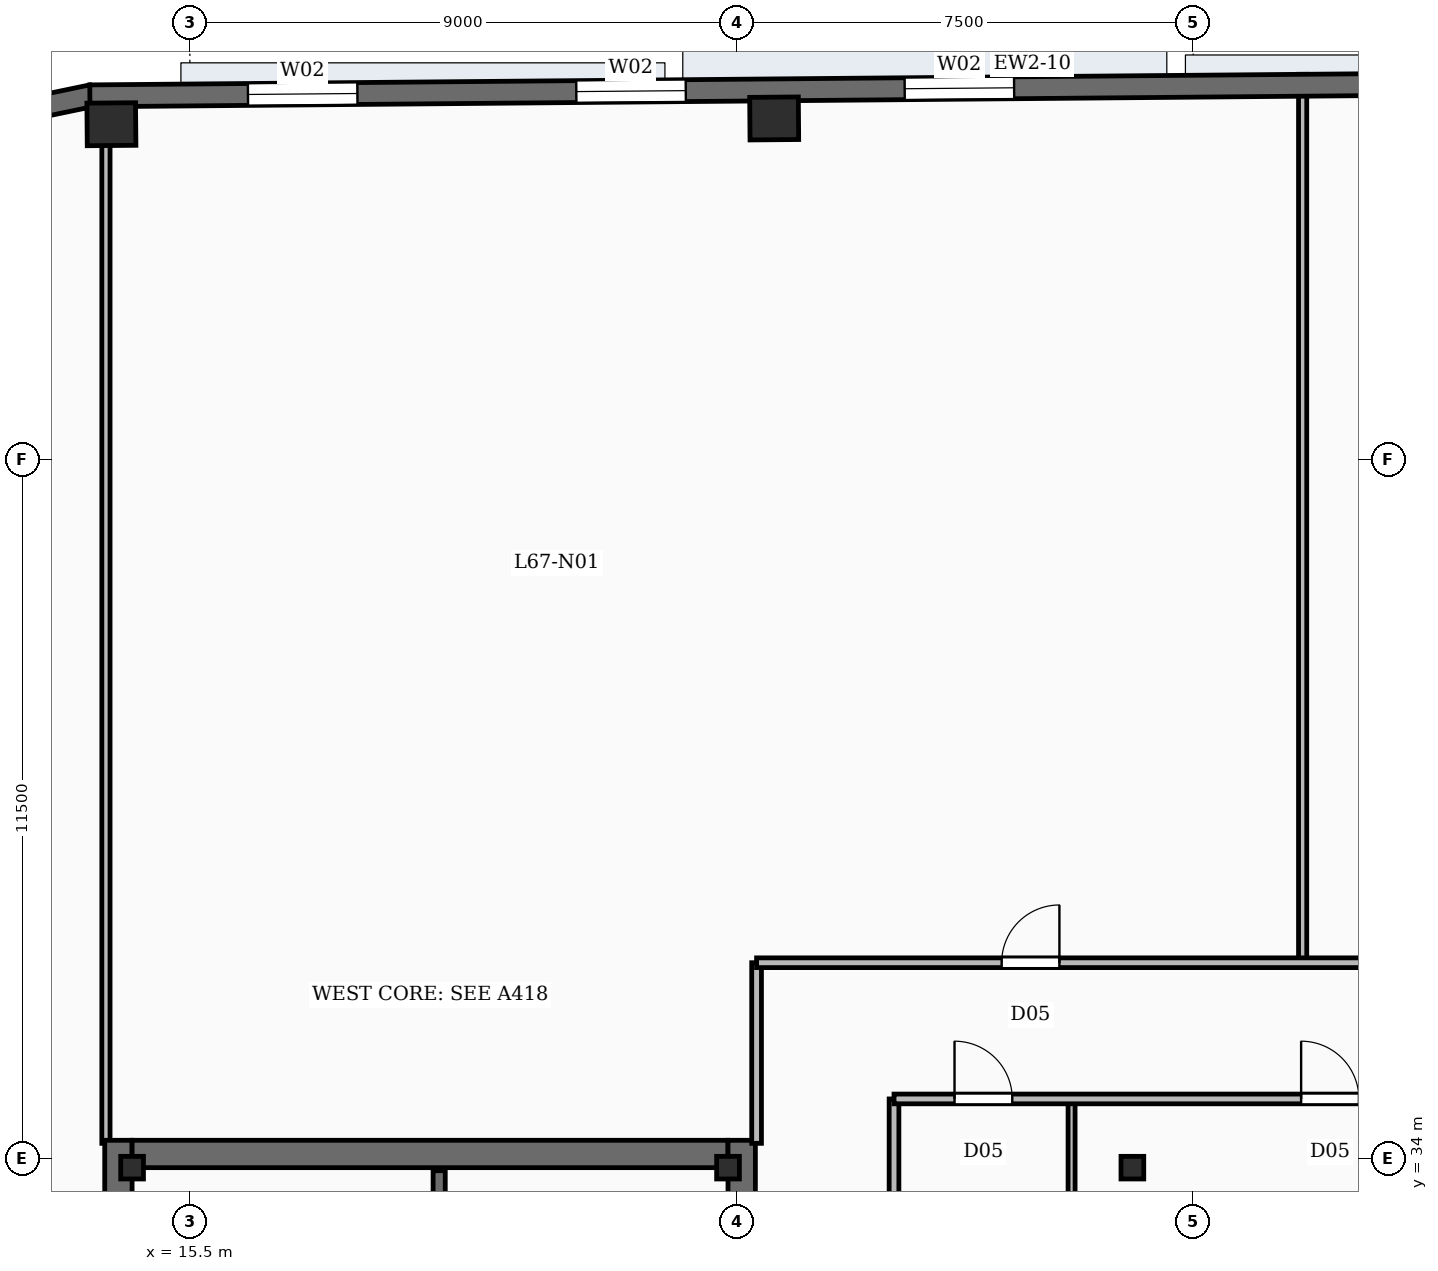
"""IFC4 building model, lengths in metres.
Left out: names, types, materials, properties, quantities, classifications, styles, units other than length and angle.
Written with IfcOpenShell. Run it as: python <this file> out.ifc"""

import sys

from ifc_helpers import new_model, si_unit, direction, frame, frame_2d, origin, origin_2d, place, context, subcontext, project, spatial, rectangle, i_section, extrude, element, fill, save


model = new_model("IFC4")
c1 = context("Model", 3, precision=1e-05, world=origin(), true_north=direction((0.0, 1.0)))
c2 = subcontext(c1, "Body", "Model", "MODEL_VIEW")
j1 = project(units=[si_unit("LENGTHUNIT", "METRE"), si_unit("PLANEANGLEUNIT", "RADIAN")], contexts=[c1])
p1 = place(None, origin())
s1 = spatial("IfcSite", under=j1, at=p1, CompositionType="ELEMENT")
p2 = place(p1, origin())
s2 = spatial("IfcBuilding", under=s1, at=p2, CompositionType="ELEMENT")
p3 = place(p2, frame((0.0, 0.0, 274.9)))
s3 = spatial("IfcBuildingStorey", under=s2, at=p3, CompositionType="ELEMENT", Elevation=274.9)
p4 = place(p3, frame((14.325, 19.0, -0.45), z_axis=(0.0, 0.0, 1.0), x_axis=(0.0, 1.0, 0.0)))
e1 = element("IfcWall", 1, at=p4, inside=s3, PredefinedType="SHEAR", context=c2, shape_type="SweptSolid", body=[
    extrude(rectangle(XDim=15.3, YDim=0.45, at=frame_2d((7.65, 0.0))), origin(), (0.0, 0.0, 1.0), 3.93),
])
p5 = place(p3, frame((24.575, 19.0, -0.45), z_axis=(0.0, 0.0, 1.0), x_axis=(0.0, 1.0, 0.0)))
e2 = element("IfcWall", 2, at=p5, inside=s3, PredefinedType="SHEAR", context=c2, shape_type="SweptSolid", body=[
    extrude(rectangle(XDim=15.3, YDim=0.45, at=frame_2d((7.65, 0.0))), origin(), (0.0, 0.0, 1.0), 3.93),
])
p6 = place(p5, frame((2.5, 0.0, 0.45)))
e3 = element("IfcOpeningElement", 3, at=p6, cuts=e2, PredefinedType="OPENING", context=c2, shape_type="SweptSolid", body=[
    extrude(rectangle(XDim=1.05, YDim=2.15, at=frame_2d((0.525, 1.075))), frame((0.0, 0.235, 0.0), z_axis=(0.0, -1.0, 0.0), x_axis=(1.0, 0.0, 0.0)), (0.0, 0.0, 1.0), 0.47),
])
p7 = place(p5, frame((7.0, 0.0, 0.45)))
e4 = element("IfcOpeningElement", 4, at=p7, cuts=e2, PredefinedType="OPENING", context=c2, shape_type="SweptSolid", body=[
    extrude(rectangle(XDim=1.05, YDim=2.15, at=frame_2d((0.525, 1.075))), frame((0.0, 0.235, 0.0), z_axis=(0.0, -1.0, 0.0), x_axis=(1.0, 0.0, 0.0)), (0.0, 0.0, 1.0), 0.47),
])
p8 = place(p3, frame((14.55, 34.075, -0.45), z_axis=(0.0, 0.0, 1.0), x_axis=(1.0, 0.0, 0.0)))
e5 = element("IfcWall", 5, at=p8, inside=s3, PredefinedType="SHEAR", context=c2, shape_type="SweptSolid", body=[
    extrude(rectangle(XDim=9.8, YDim=0.45, at=frame_2d((4.9, 0.0))), origin(), (0.0, 0.0, 1.0), 3.93),
])
for number, where, z_axis, x_axis in (
    (6, (14.55, 33.85, -0.45), (0.0, 0.0, 1.0), (1.0, 0.0, 0.0)),
    (7, (24.35, 33.85, -0.45), (0.0, 0.0, 1.0), (1.0, 0.0, 0.0)),
    (8, (31.0, 33.85, -0.45), (0.0, 0.0, 1.0), (1.0, 0.0, 0.0)),
):
    element("IfcColumn", number, at=place(p3, frame(where, z_axis=z_axis, x_axis=x_axis)), inside=s3, PredefinedType="COLUMN", context=c2, shape_type="SweptSolid", body=[
        extrude(i_section(OverallWidth=0.374, OverallDepth=0.372, WebThickness=0.016, FlangeThickness=0.026, FilletRadius=0.02, at=origin_2d()), origin(), (0.0, 0.0, 1.0), 3.93),
    ])
for number, where, z_axis, x_axis in (
    (9, (25.109, 51.104, -0.45), (0.0, 0.0, 1.0), (1.0, 0.009, 0.0)),
    (10, (14.21, 51.009, -0.45), (0.0, 0.0, 1.0), (1.0, 0.009, 0.0)),
):
    element("IfcColumn", number, at=place(p3, frame(where, z_axis=z_axis, x_axis=x_axis)), inside=s3, PredefinedType="COLUMN", context=c2, shape_type="SweptSolid", body=[
        extrude(rectangle(XDim=0.8, YDim=0.7, at=origin_2d()), origin(), (0.0, 0.0, 1.0), 3.93),
    ])
p9 = place(p3, frame((13.856, 51.476, 0.0), z_axis=(0.0, 0.0, 1.0), x_axis=(0.999961944954, 0.008724026757, 0.0)))
e11 = element("IfcWall", 11, at=p9, inside=s3, PredefinedType="SOLIDWALL", context=c2, shape_type="SweptSolid", body=[
    extrude(rectangle(XDim=44.3, YDim=0.36, at=frame_2d((22.15, 0.0))), origin(), (0.0, 0.0, 1.0), 3.48),
])
p10 = place(p9, frame((2.6, 0.0, 0.88)))
e12 = element("IfcOpeningElement", 12, at=p10, cuts=e11, PredefinedType="OPENING", context=c2, shape_type="SweptSolid", body=[
    extrude(rectangle(XDim=1.8, YDim=2.15, at=frame_2d((0.9, 1.075))), frame((0.0, 0.19, 0.0), z_axis=(0.0, -1.0, 0.0), x_axis=(1.0, 0.0, 0.0)), (0.0, 0.0, 1.0), 0.38),
])
p11 = place(p9, frame((8.0, 0.0, 0.88)))
e13 = element("IfcOpeningElement", 13, at=p11, cuts=e11, PredefinedType="OPENING", context=c2, shape_type="SweptSolid", body=[
    extrude(rectangle(XDim=1.8, YDim=2.15, at=frame_2d((0.9, 1.075))), frame((0.0, 0.19, 0.0), z_axis=(0.0, -1.0, 0.0), x_axis=(1.0, 0.0, 0.0)), (0.0, 0.0, 1.0), 0.38),
])
p12 = place(p9, frame((13.4, 0.0, 0.88)))
e14 = element("IfcOpeningElement", 14, at=p12, cuts=e11, PredefinedType="OPENING", context=c2, shape_type="SweptSolid", body=[
    extrude(rectangle(XDim=1.8, YDim=2.15, at=frame_2d((0.9, 1.075))), frame((0.0, 0.19, 0.0), z_axis=(0.0, -1.0, 0.0), x_axis=(1.0, 0.0, 0.0)), (0.0, 0.0, 1.0), 0.38),
])
p13 = place(p9, frame((24.2, 0.0, 0.88)))
e15 = element("IfcOpeningElement", 15, at=p13, cuts=e11, PredefinedType="OPENING", context=c2, shape_type="SweptSolid", body=[
    extrude(rectangle(XDim=1.8, YDim=2.15, at=frame_2d((0.9, 1.075))), frame((0.0, 0.19, 0.0), z_axis=(0.0, -1.0, 0.0), x_axis=(1.0, 0.0, 0.0)), (0.0, 0.0, 1.0), 0.38),
])
p14 = place(p9, frame((35.0, 0.0, 0.88)))
e16 = element("IfcOpeningElement", 16, at=p14, cuts=e11, PredefinedType="OPENING", context=c2, shape_type="SweptSolid", body=[
    extrude(rectangle(XDim=1.8, YDim=2.15, at=frame_2d((0.9, 1.075))), frame((0.0, 0.19, 0.0), z_axis=(0.0, -1.0, 0.0), x_axis=(1.0, 0.0, 0.0)), (0.0, 0.0, 1.0), 0.38),
])
p15 = place(p3, frame((11.828, 51.051, 0.0), z_axis=(0.0, 0.0, 1.0), x_axis=(0.97905458633, 0.203597929717, 0.0)))
e17 = element("IfcWall", 17, at=p15, inside=s3, PredefinedType="SOLIDWALL", context=c2, shape_type="SweptSolid", body=[
    extrude(rectangle(XDim=2.107, YDim=0.36, at=frame_2d((1.053, 0.0))), origin(), (0.0, 0.0, 1.0), 3.48),
])
p16 = place(p3, frame((19.6, 32.37, 0.0), z_axis=(0.0, 0.0, 1.0), x_axis=(0.0, 1.0, 0.0)))
e18 = element("IfcWall", 18, at=p16, inside=s3, PredefinedType="SOLIDWALL", context=c2, shape_type="SweptSolid", body=[
    extrude(rectangle(XDim=1.43, YDim=0.2, at=frame_2d((0.715, 0.0))), origin(), (0.0, 0.0, 1.0), 3.48),
])
p17 = place(p3, frame((33.8, 37.22, 0.0), z_axis=(0.0, 0.0, 1.0), x_axis=(0.0, 1.0, 0.0)))
e19 = element("IfcWall", 19, at=p17, inside=s3, PredefinedType="PARTITIONING", context=c2, shape_type="SweptSolid", body=[
    extrude(rectangle(XDim=14.61, YDim=0.135, at=frame_2d((7.305, 0.0))), origin(), (0.0, 0.0, 1.0), 2.54),
])
p18 = place(p3, frame((24.82, 34.25, 0.0), z_axis=(0.0, 0.0, 1.0), x_axis=(0.0, 1.0, 0.0)))
e20 = element("IfcWall", 20, at=p18, inside=s3, PredefinedType="PARTITIONING", context=c2, shape_type="SweptSolid", body=[
    extrude(rectangle(XDim=2.97, YDim=0.16, at=frame_2d((1.485, 0.0))), origin(), (0.0, 0.0, 1.0), 2.54),
])
p19 = place(p3, frame((14.12, 34.25, 0.0), z_axis=(0.0, 0.0, 1.0), x_axis=(0.0, 1.0, 0.0)))
e21 = element("IfcWall", 21, at=p19, inside=s3, PredefinedType="PARTITIONING", context=c2, shape_type="SweptSolid", body=[
    extrude(rectangle(XDim=17.168, YDim=0.135, at=frame_2d((8.584, 0.0))), origin(), (0.0, 0.0, 1.0), 2.54),
])
p20 = place(p3, frame((24.82, 37.22, 0.0), z_axis=(0.0, 0.0, 1.0), x_axis=(1.0, 0.0, 0.0)))
e22 = element("IfcWall", 22, at=p20, inside=s3, PredefinedType="PARTITIONING", context=c2, shape_type="SweptSolid", body=[
    extrude(rectangle(XDim=25.26, YDim=0.16, at=frame_2d((12.63, 0.0))), origin(), (0.0, 0.0, 1.0), 2.54),
])
p21 = place(p20, frame((4.03, 0.0, 0.0)))
e23 = element("IfcOpeningElement", 23, at=p21, cuts=e22, PredefinedType="OPENING", context=c2, shape_type="SweptSolid", body=[
    extrude(rectangle(XDim=0.95, YDim=2.15, at=frame_2d((0.475, 1.075))), frame((0.0, 0.09, 0.0), z_axis=(0.0, -1.0, 0.0), x_axis=(1.0, 0.0, 0.0)), (0.0, 0.0, 1.0), 0.18),
])
p22 = place(p20, frame((13.355, 0.0, 0.0)))
e24 = element("IfcOpeningElement", 24, at=p22, cuts=e22, PredefinedType="OPENING", context=c2, shape_type="SweptSolid", body=[
    extrude(rectangle(XDim=0.95, YDim=2.15, at=frame_2d((0.475, 1.075))), frame((0.0, 0.09, 0.0), z_axis=(0.0, -1.0, 0.0), x_axis=(1.0, 0.0, 0.0)), (0.0, 0.0, 1.0), 0.18),
])
p23 = place(p20, frame((21.48, 0.0, 0.0)))
e25 = element("IfcOpeningElement", 25, at=p23, cuts=e22, PredefinedType="OPENING", context=c2, shape_type="SweptSolid", body=[
    extrude(rectangle(XDim=0.95, YDim=2.15, at=frame_2d((0.475, 1.075))), frame((0.0, 0.09, 0.0), z_axis=(0.0, -1.0, 0.0), x_axis=(1.0, 0.0, 0.0)), (0.0, 0.0, 1.0), 0.18),
])
p24 = place(p3, frame((30.0, 15.38, 0.0), z_axis=(0.0, 0.0, 1.0), x_axis=(0.0, 1.0, 0.0)))
e26 = element("IfcWall", 26, at=p24, inside=s3, PredefinedType="PARTITIONING", context=c2, shape_type="SweptSolid", body=[
    extrude(rectangle(XDim=19.6, YDim=0.115, at=frame_2d((9.8, 0.0))), origin(), (0.0, 0.0, 1.0), 2.54),
])
p25 = place(p3, frame((27.08, 34.98, 0.0), z_axis=(0.0, 0.0, 1.0), x_axis=(1.0, 0.0, 0.0)))
e27 = element("IfcWall", 27, at=p25, inside=s3, PredefinedType="PARTITIONING", context=c2, shape_type="SweptSolid", body=[
    extrude(rectangle(XDim=20.74, YDim=0.16, at=frame_2d((10.37, 0.0))), origin(), (0.0, 0.0, 1.0), 2.54),
])
p26 = place(p25, frame((0.995, 0.0, 0.0)))
e28 = element("IfcOpeningElement", 28, at=p26, cuts=e27, PredefinedType="OPENING", context=c2, shape_type="SweptSolid", body=[
    extrude(rectangle(XDim=0.95, YDim=2.15, at=frame_2d((0.475, 1.075))), frame((0.0, 0.09, 0.0), z_axis=(0.0, -1.0, 0.0), x_axis=(1.0, 0.0, 0.0)), (0.0, 0.0, 1.0), 0.18),
])
p27 = place(p25, frame((6.695, 0.0, 0.0)))
e29 = element("IfcOpeningElement", 29, at=p27, cuts=e27, PredefinedType="OPENING", context=c2, shape_type="SweptSolid", body=[
    extrude(rectangle(XDim=0.95, YDim=2.15, at=frame_2d((0.475, 1.075))), frame((0.0, 0.09, 0.0), z_axis=(0.0, -1.0, 0.0), x_axis=(1.0, 0.0, 0.0)), (0.0, 0.0, 1.0), 0.18),
])
p28 = place(p25, frame((13.945, 0.0, 0.0)))
e30 = element("IfcOpeningElement", 30, at=p28, cuts=e27, PredefinedType="OPENING", context=c2, shape_type="SweptSolid", body=[
    extrude(rectangle(XDim=0.95, YDim=2.15, at=frame_2d((0.475, 1.075))), frame((0.0, 0.09, 0.0), z_axis=(0.0, -1.0, 0.0), x_axis=(1.0, 0.0, 0.0)), (0.0, 0.0, 1.0), 0.18),
])
p29 = place(p25, frame((18.595, 0.0, 0.0)))
e31 = element("IfcOpeningElement", 31, at=p29, cuts=e27, PredefinedType="OPENING", context=c2, shape_type="SweptSolid", body=[
    extrude(rectangle(XDim=0.95, YDim=2.15, at=frame_2d((0.475, 1.075))), frame((0.0, 0.09, 0.0), z_axis=(0.0, -1.0, 0.0), x_axis=(1.0, 0.0, 0.0)), (0.0, 0.0, 1.0), 0.18),
])
p30 = place(p3, frame((27.08, 15.38, 0.0), z_axis=(0.0, 0.0, 1.0), x_axis=(0.0, 1.0, 0.0)))
e32 = element("IfcWall", 32, at=p30, inside=s3, PredefinedType="PARTITIONING", context=c2, shape_type="SweptSolid", body=[
    extrude(rectangle(XDim=19.6, YDim=0.16, at=frame_2d((9.8, 0.0))), origin(), (0.0, 0.0, 1.0), 2.54),
])
p31 = place(p10, origin())
e33 = element("IfcWindow", 33, at=p31, inside=s3, PartitioningType="DOUBLE_PANEL_VERTICAL", PredefinedType="WINDOW", context=c2, shape_type="SweptSolid", body=[
    extrude(rectangle(XDim=1.8, YDim=2.15, at=frame_2d((0.9, 1.075))), frame((0.0, 0.03, 0.0), z_axis=(0.0, -1.0, 0.0), x_axis=(1.0, 0.0, 0.0)), (0.0, 0.0, 1.0), 0.06),
])
fill(e12, e33)
p32 = place(p11, origin())
e34 = element("IfcWindow", 34, at=p32, inside=s3, PartitioningType="DOUBLE_PANEL_VERTICAL", PredefinedType="WINDOW", context=c2, shape_type="SweptSolid", body=[
    extrude(rectangle(XDim=1.8, YDim=2.15, at=frame_2d((0.9, 1.075))), frame((0.0, 0.03, 0.0), z_axis=(0.0, -1.0, 0.0), x_axis=(1.0, 0.0, 0.0)), (0.0, 0.0, 1.0), 0.06),
])
fill(e13, e34)
p33 = place(p12, origin())
e35 = element("IfcWindow", 35, at=p33, inside=s3, PartitioningType="DOUBLE_PANEL_VERTICAL", PredefinedType="WINDOW", context=c2, shape_type="SweptSolid", body=[
    extrude(rectangle(XDim=1.8, YDim=2.15, at=frame_2d((0.9, 1.075))), frame((0.0, 0.03, 0.0), z_axis=(0.0, -1.0, 0.0), x_axis=(1.0, 0.0, 0.0)), (0.0, 0.0, 1.0), 0.06),
])
fill(e14, e35)
p34 = place(p21, origin())
e36 = element("IfcDoor", 36, at=p34, inside=s3, OperationType="SINGLE_SWING_RIGHT", PredefinedType="DOOR", context=c2, shape_type="SweptSolid", body=[
    extrude(rectangle(XDim=0.95, YDim=2.15, at=frame_2d((0.475, 1.075))), frame((0.0, 0.025, 0.0), z_axis=(0.0, -1.0, 0.0), x_axis=(1.0, 0.0, 0.0)), (0.0, 0.0, 1.0), 0.05),
])
fill(e23, e36)
p35 = place(p26, origin())
e37 = element("IfcDoor", 37, at=p35, inside=s3, OperationType="SINGLE_SWING_LEFT", PredefinedType="DOOR", context=c2, shape_type="SweptSolid", body=[
    extrude(rectangle(XDim=0.95, YDim=2.15, at=frame_2d((0.475, 1.075))), frame((0.0, 0.025, 0.0), z_axis=(0.0, -1.0, 0.0), x_axis=(1.0, 0.0, 0.0)), (0.0, 0.0, 1.0), 0.05),
])
fill(e28, e37)
p36 = place(p27, origin())
e38 = element("IfcDoor", 38, at=p36, inside=s3, OperationType="SINGLE_SWING_LEFT", PredefinedType="DOOR", context=c2, shape_type="SweptSolid", body=[
    extrude(rectangle(XDim=0.95, YDim=2.15, at=frame_2d((0.475, 1.075))), frame((0.0, 0.025, 0.0), z_axis=(0.0, -1.0, 0.0), x_axis=(1.0, 0.0, 0.0)), (0.0, 0.0, 1.0), 0.05),
])
fill(e29, e38)
save(model, sys.argv[1])
